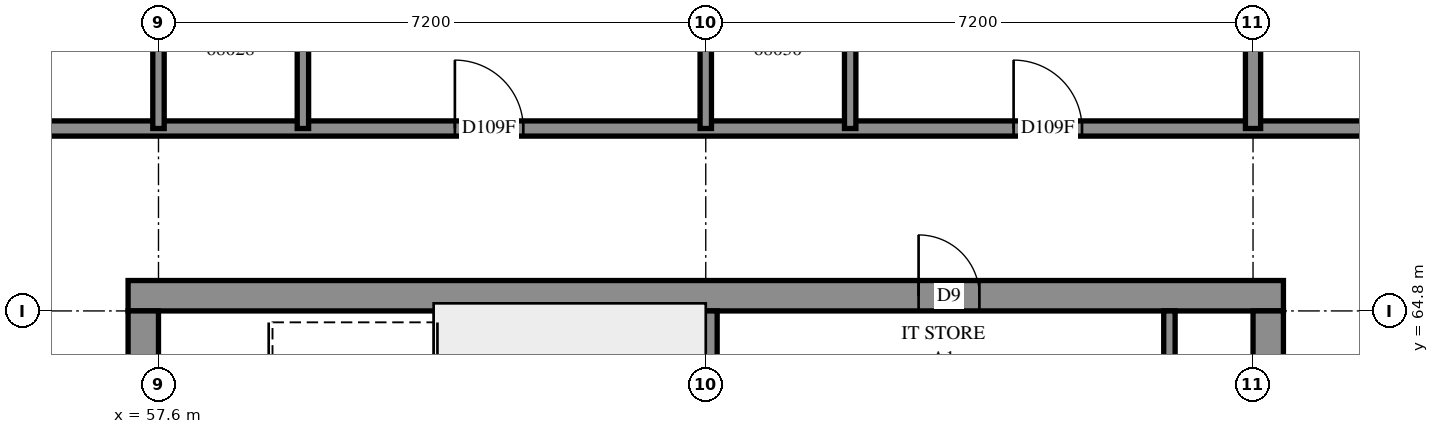
"""IFC4 building model, lengths in metres.
Left out: names, types, materials, properties, quantities, classifications, styles, units other than length and angle.
Written with IfcOpenShell. Run it as: python <this file> out.ifc"""

import sys

from ifc_helpers import new_model, si_unit, direction, frame, frame_2d, origin, place, context, subcontext, project, spatial, rectangle, extrude, element, fill, save


model = new_model("IFC4")
c1 = context("Model", 3, precision=1e-05, world=origin(), true_north=direction((0.0, 1.0)))
c2 = subcontext(c1, "Body", "Model", "MODEL_VIEW")
j1 = project(units=[si_unit("LENGTHUNIT", "METRE"), si_unit("PLANEANGLEUNIT", "RADIAN")], contexts=[c1])
p1 = place(None, origin())
s1 = spatial("IfcSite", under=j1, at=p1, CompositionType="ELEMENT")
p2 = place(p1, origin())
s2 = spatial("IfcBuilding", under=s1, at=p2, CompositionType="ELEMENT")
p3 = place(p2, frame((0.0, 0.0, 250.6)))
s3 = spatial("IfcBuildingStorey", under=s2, at=p3, CompositionType="ELEMENT", Elevation=250.6)
p4 = place(p3, frame((57.2, 65.0, -0.3), z_axis=(0.0, 0.0, 1.0), x_axis=(1.0, 0.0, 0.0)))
e1 = element("IfcWall", 1, at=p4, inside=s3, PredefinedType="SHEAR", context=c2, shape_type="SweptSolid", body=[
    extrude(rectangle(XDim=15.2, YDim=0.4, at=frame_2d((7.6, 0.0))), origin(), (0.0, 0.0, 1.0), 2.7),
])
p5 = place(p4, frame((10.4, 0.0, 0.3)))
e2 = element("IfcOpeningElement", 2, at=p5, cuts=e1, PredefinedType="OPENING", context=c2, shape_type="SweptSolid", body=[
    extrude(rectangle(XDim=0.8, YDim=2.1, at=frame_2d((0.4, 1.05))), frame((0.0, 0.21, 0.0), z_axis=(0.0, -1.0, 0.0), x_axis=(1.0, 0.0, 0.0)), (0.0, 0.0, 1.0), 0.42),
])
p6 = place(p3, frame((57.4, 50.4, -0.3), z_axis=(0.0, 0.0, 1.0), x_axis=(0.0, 1.0, 0.0)))
e3 = element("IfcWall", 3, at=p6, inside=s3, PredefinedType="SHEAR", context=c2, shape_type="SweptSolid", body=[
    extrude(rectangle(XDim=14.4, YDim=0.4, at=frame_2d((7.2, 0.0))), origin(), (0.0, 0.0, 1.0), 2.7),
])
p7 = place(p6, frame((4.55, 0.0, 0.3)))
e4 = element("IfcOpeningElement", 4, at=p7, cuts=e3, PredefinedType="OPENING", context=c2, shape_type="SweptSolid", body=[
    extrude(rectangle(XDim=1.1, YDim=2.1, at=frame_2d((0.55, 1.05))), frame((0.0, 0.21, 0.0), z_axis=(0.0, -1.0, 0.0), x_axis=(1.0, 0.0, 0.0)), (0.0, 0.0, 1.0), 0.42),
])
p8 = place(p6, frame((11.35, 0.0, 0.3)))
e5 = element("IfcOpeningElement", 5, at=p8, cuts=e3, PredefinedType="OPENING", context=c2, shape_type="SweptSolid", body=[
    extrude(rectangle(XDim=1.1, YDim=2.1, at=frame_2d((0.55, 1.05))), frame((0.0, 0.21, 0.0), z_axis=(0.0, -1.0, 0.0), x_axis=(1.0, 0.0, 0.0)), (0.0, 0.0, 1.0), 0.42),
])
p9 = place(p3, frame((72.2, 50.4, -0.3), z_axis=(0.0, 0.0, 1.0), x_axis=(0.0, 1.0, 0.0)))
e6 = element("IfcWall", 6, at=p9, inside=s3, PredefinedType="SHEAR", context=c2, shape_type="SweptSolid", body=[
    extrude(rectangle(XDim=14.4, YDim=0.4, at=frame_2d((7.2, 0.0))), origin(), (0.0, 0.0, 1.0), 2.7),
])
p10 = place(p9, frame((4.55, 0.0, 0.3)))
e7 = element("IfcOpeningElement", 7, at=p10, cuts=e6, PredefinedType="OPENING", context=c2, shape_type="SweptSolid", body=[
    extrude(rectangle(XDim=1.1, YDim=2.1, at=frame_2d((0.55, 1.05))), frame((0.0, 0.21, 0.0), z_axis=(0.0, -1.0, 0.0), x_axis=(1.0, 0.0, 0.0)), (0.0, 0.0, 1.0), 0.42),
])
p11 = place(p9, frame((11.35, 0.0, 0.3)))
e8 = element("IfcOpeningElement", 8, at=p11, cuts=e6, PredefinedType="OPENING", context=c2, shape_type="SweptSolid", body=[
    extrude(rectangle(XDim=1.1, YDim=2.1, at=frame_2d((0.55, 1.05))), frame((0.0, 0.21, 0.0), z_axis=(0.0, -1.0, 0.0), x_axis=(1.0, 0.0, 0.0)), (0.0, 0.0, 1.0), 0.42),
])
p12 = place(p3, frame((64.8, 60.6, 0.0), z_axis=(0.0, 0.0, 1.0), x_axis=(0.0, 1.0, 0.0)))
e9 = element("IfcWall", 9, at=p12, inside=s3, PredefinedType="SOLIDWALL", context=c2, shape_type="SweptSolid", body=[
    extrude(rectangle(XDim=4.2, YDim=0.3, at=frame_2d((2.1, 0.0))), origin(), (0.0, 0.0, 1.0), 3.1),
])
p13 = place(p3, frame((70.9, 63.78, 0.0), z_axis=(0.0, 0.0, 1.0), x_axis=(0.0, 1.0, 0.0)))
e10 = element("IfcWall", 10, at=p13, inside=s3, PredefinedType="PARTITIONING", context=c2, shape_type="SweptSolid", body=[
    extrude(rectangle(XDim=1.02, YDim=0.15, at=frame_2d((0.51, 0.0))), origin(), (0.0, 0.0, 1.0), 3.1),
])
p14 = place(p3, frame((55.2, 67.2, 0.0), z_axis=(0.0, 0.0, 1.0), x_axis=(1.0, 0.0, 0.0)))
e11 = element("IfcWall", 11, at=p14, inside=s3, PredefinedType="PARTITIONING", context=c2, shape_type="SweptSolid", body=[
    extrude(rectangle(XDim=19.2, YDim=0.2, at=frame_2d((9.6, 0.0))), origin(), (0.0, 0.0, 1.0), 3.1),
])
p15 = place(p14, frame((6.299, 0.0, 0.0)))
e12 = element("IfcOpeningElement", 12, at=p15, cuts=e11, PredefinedType="OPENING", context=c2, shape_type="SweptSolid", body=[
    extrude(rectangle(XDim=0.9, YDim=2.1, at=frame_2d((0.45, 1.05))), frame((0.0, 0.11, 0.0), z_axis=(0.0, -1.0, 0.0), x_axis=(1.0, 0.0, 0.0)), (0.0, 0.0, 1.0), 0.22),
])
p16 = place(p14, frame((13.65, 0.0, 0.0)))
e13 = element("IfcOpeningElement", 13, at=p16, cuts=e11, PredefinedType="OPENING", context=c2, shape_type="SweptSolid", body=[
    extrude(rectangle(XDim=0.9, YDim=2.1, at=frame_2d((0.45, 1.05))), frame((0.0, 0.11, 0.0), z_axis=(0.0, -1.0, 0.0), x_axis=(1.0, 0.0, 0.0)), (0.0, 0.0, 1.0), 0.22),
])
p17 = place(p3, frame((72.0, 67.2, 0.0), z_axis=(0.0, 0.0, 1.0), x_axis=(0.0, 1.0, 0.0)))
e14 = element("IfcWall", 14, at=p17, inside=s3, PredefinedType="PARTITIONING", context=c2, shape_type="SweptSolid", body=[
    extrude(rectangle(XDim=4.346, YDim=0.2, at=frame_2d((2.173, 0.0))), origin(), (0.0, 0.0, 1.0), 3.1),
])
for number, where, z_axis, x_axis in (
    (15, (59.5, 67.2, 0.0), (0.0, 0.0, 1.0), (0.0, 1.0, 0.0)),
    (16, (57.6, 67.2, 0.0), (0.0, 0.0, 1.0), (0.0, 1.0, 0.0)),
    (17, (66.7, 67.2, 0.0), (0.0, 0.0, 1.0), (0.0, 1.0, 0.0)),
    (18, (64.8, 67.2, 0.0), (0.0, 0.0, 1.0), (0.0, 1.0, 0.0)),
):
    element("IfcWall", number, at=place(p3, frame(where, z_axis=z_axis, x_axis=x_axis)), inside=s3, PredefinedType="PARTITIONING", context=c2, shape_type="SweptSolid", body=[
        extrude(rectangle(XDim=2.4, YDim=0.15, at=frame_2d((1.2, 0.0))), origin(), (0.0, 0.0, 1.0), 3.1),
    ])
p18 = place(p5, origin())
e19 = element("IfcDoor", 19, at=p18, inside=s3, OperationType="SINGLE_SWING_RIGHT", PredefinedType="DOOR", context=c2, shape_type="SweptSolid", body=[
    extrude(rectangle(XDim=0.8, YDim=2.1, at=frame_2d((0.4, 1.05))), frame((0.0, 0.025, 0.0), z_axis=(0.0, -1.0, 0.0), x_axis=(1.0, 0.0, 0.0)), (0.0, 0.0, 1.0), 0.05),
])
fill(e2, e19)
p19 = place(p15, origin())
e20 = element("IfcDoor", 20, at=p19, inside=s3, OperationType="SINGLE_SWING_RIGHT", PredefinedType="DOOR", context=c2, shape_type="SweptSolid", body=[
    extrude(rectangle(XDim=0.9, YDim=2.1, at=frame_2d((0.45, 1.05))), frame((0.0, 0.025, 0.0), z_axis=(0.0, -1.0, 0.0), x_axis=(1.0, 0.0, 0.0)), (0.0, 0.0, 1.0), 0.05),
])
fill(e12, e20)
p20 = place(p16, origin())
e21 = element("IfcDoor", 21, at=p20, inside=s3, OperationType="SINGLE_SWING_RIGHT", PredefinedType="DOOR", context=c2, shape_type="SweptSolid", body=[
    extrude(rectangle(XDim=0.9, YDim=2.1, at=frame_2d((0.45, 1.05))), frame((0.0, 0.025, 0.0), z_axis=(0.0, -1.0, 0.0), x_axis=(1.0, 0.0, 0.0)), (0.0, 0.0, 1.0), 0.05),
])
fill(e13, e21)
save(model, sys.argv[1])
